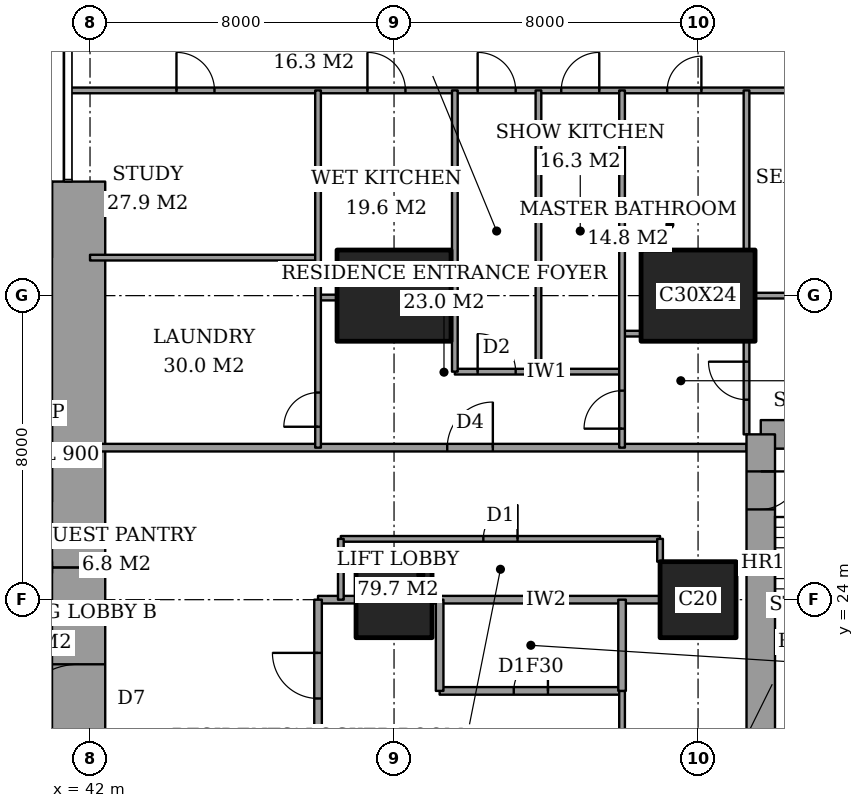
"""IFC4 building model, lengths in metres.
Left out: names, types, materials, properties, quantities, classifications, styles, units other than length and angle.
Written with IfcOpenShell. Run it as: python <this file> out.ifc"""

import sys

from ifc_helpers import new_model, si_unit, direction, frame, frame_2d, origin, origin_2d, place, context, subcontext, project, spatial, rectangle, extrude, element, fill, save


model = new_model("IFC4")
c1 = context("Model", 3, precision=1e-05, world=origin(), true_north=direction((0.0, 1.0)))
c2 = subcontext(c1, "Body", "Model", "MODEL_VIEW")
j1 = project(units=[si_unit("LENGTHUNIT", "METRE"), si_unit("PLANEANGLEUNIT", "RADIAN")], contexts=[c1])
p1 = place(None, origin())
s1 = spatial("IfcSite", under=j1, at=p1, CompositionType="ELEMENT")
p2 = place(p1, origin())
s2 = spatial("IfcBuilding", under=s1, at=p2, CompositionType="ELEMENT")
p3 = place(p2, frame((0.0, 0.0, 80.0)))
s3 = spatial("IfcBuildingStorey", under=s2, at=p3, CompositionType="ELEMENT", Elevation=80.0)
p4 = place(p3, frame((50.0, 24.0, 0.0), z_axis=(0.0, 0.0, 1.0), x_axis=(1.0, 0.0, 0.0)))
e1 = element("IfcColumn", 1, at=p4, inside=s3, PredefinedType="COLUMN", context=c2, shape_type="SweptSolid", body=[
    extrude(rectangle(XDim=2.0, YDim=2.0, at=origin_2d()), origin(), (0.0, 0.0, 1.0), 3.6),
])
p5 = place(p3, frame((50.0, 32.0, 0.0), z_axis=(0.0, 0.0, 1.0), x_axis=(1.0, 0.0, 0.0)))
e2 = element("IfcColumn", 2, at=p5, inside=s3, PredefinedType="COLUMN", context=c2, shape_type="SweptSolid", body=[
    extrude(rectangle(XDim=3.0, YDim=2.4, at=origin_2d()), origin(), (0.0, 0.0, 1.0), 3.6),
])
p6 = place(p3, frame((58.0, 24.0, 0.0), z_axis=(0.0, 0.0, 1.0), x_axis=(1.0, 0.0, 0.0)))
e3 = element("IfcColumn", 3, at=p6, inside=s3, PredefinedType="COLUMN", context=c2, shape_type="SweptSolid", body=[
    extrude(rectangle(XDim=2.0, YDim=2.0, at=origin_2d()), origin(), (0.0, 0.0, 1.0), 3.6),
])
p7 = place(p3, frame((58.0, 32.0, 0.0), z_axis=(0.0, 0.0, 1.0), x_axis=(1.0, 0.0, 0.0)))
e4 = element("IfcColumn", 4, at=p7, inside=s3, PredefinedType="COLUMN", context=c2, shape_type="SweptSolid", body=[
    extrude(rectangle(XDim=3.0, YDim=2.4, at=origin_2d()), origin(), (0.0, 0.0, 1.0), 3.6),
])
p8 = place(p3, frame((41.7, 13.0, 0.0), z_axis=(0.0, 0.0, 1.0), x_axis=(0.0, 1.0, 0.0)))
e5 = element("IfcWall", 5, at=p8, inside=s3, PredefinedType="SHEAR", context=c2, shape_type="SweptSolid", body=[
    extrude(rectangle(XDim=11.85, YDim=1.4, at=frame_2d((5.925, 0.0))), origin(), (0.0, 0.0, 1.0), 3.6),
])
p9 = place(p8, frame((7.5, 0.0, 0.0)))
e6 = element("IfcOpeningElement", 6, at=p9, cuts=e5, PredefinedType="OPENING", context=c2, shape_type="SweptSolid", body=[
    extrude(rectangle(XDim=1.8, YDim=2.4, at=frame_2d((0.9, 1.2))), frame((0.0, 0.71, 0.0), z_axis=(0.0, -1.0, 0.0), x_axis=(1.0, 0.0, 0.0)), (0.0, 0.0, 1.0), 1.42),
])
p10 = place(p3, frame((41.7, 24.85, 0.0), z_axis=(0.0, 0.0, 1.0), x_axis=(0.0, 1.0, 0.0)))
e7 = element("IfcWall", 7, at=p10, inside=s3, PredefinedType="SHEAR", context=c2, shape_type="SweptSolid", body=[
    extrude(rectangle(XDim=10.15, YDim=1.4, at=frame_2d((5.075, 0.0))), origin(), (0.0, 0.0, 1.0), 3.6),
])
p11 = place(p3, frame((64.1, 28.35, 0.0), z_axis=(0.0, 0.0, 1.0), x_axis=(-1.0, 0.0, 0.0)))
e8 = element("IfcWall", 8, at=p11, inside=s3, PredefinedType="SHEAR", context=c2, shape_type="SweptSolid", body=[
    extrude(rectangle(XDim=4.45, YDim=0.75, at=frame_2d((2.225, 0.0))), origin(), (0.0, 0.0, 1.0), 3.6),
])
p12 = place(p3, frame((59.65, 28.35, 0.0), z_axis=(0.0, 0.0, 1.0), x_axis=(0.0, -1.0, 0.0)))
e9 = element("IfcWall", 9, at=p12, inside=s3, PredefinedType="SHEAR", context=c2, shape_type="SweptSolid", body=[
    extrude(rectangle(XDim=8.7, YDim=0.75, at=frame_2d((4.35, 0.0))), origin(), (0.0, 0.0, 1.0), 3.6),
])
p13 = place(p12, frame((0.975, 0.0, 0.0)))
e10 = element("IfcOpeningElement", 10, at=p13, cuts=e9, PredefinedType="OPENING", context=c2, shape_type="SweptSolid", body=[
    extrude(rectangle(XDim=1.0, YDim=2.1, at=frame_2d((0.5, 1.05))), frame((0.0, 0.385, 0.0), z_axis=(0.0, -1.0, 0.0), x_axis=(1.0, 0.0, 0.0)), (0.0, 0.0, 1.0), 0.77),
])
p14 = place(p3, frame((51.2, 21.6, 0.0), z_axis=(0.0, 0.0, 1.0), x_axis=(1.0, 0.0, 0.0)))
e11 = element("IfcWall", 11, at=p14, inside=s3, PredefinedType="PARTITIONING", context=c2, shape_type="SweptSolid", body=[
    extrude(rectangle(XDim=4.8, YDim=0.2, at=frame_2d((2.4, 0.0))), origin(), (0.0, 0.0, 1.0), 3.35),
])
p15 = place(p14, frame((1.95, 0.0, 0.0)))
e12 = element("IfcOpeningElement", 12, at=p15, cuts=e11, PredefinedType="OPENING", context=c2, shape_type="SweptSolid", body=[
    extrude(rectangle(XDim=0.9, YDim=2.1, at=frame_2d((0.45, 1.05))), frame((0.0, 0.11, 0.0), z_axis=(0.0, -1.0, 0.0), x_axis=(1.0, 0.0, 0.0)), (0.0, 0.0, 1.0), 0.22),
])
p16 = place(p3, frame((48.0, 24.0, 0.0), z_axis=(0.0, 0.0, 1.0), x_axis=(1.0, 0.0, 0.0)))
e13 = element("IfcWall", 13, at=p16, inside=s3, PredefinedType="PARTITIONING", context=c2, shape_type="SweptSolid", body=[
    extrude(rectangle(XDim=1.0, YDim=0.2, at=frame_2d((0.5, 0.0))), origin(), (0.0, 0.0, 1.0), 3.35),
])
p17 = place(p3, frame((51.0, 24.0, 0.0), z_axis=(0.0, 0.0, 1.0), x_axis=(1.0, 0.0, 0.0)))
e14 = element("IfcWall", 14, at=p17, inside=s3, PredefinedType="PARTITIONING", context=c2, shape_type="SweptSolid", body=[
    extrude(rectangle(XDim=6.0, YDim=0.2, at=frame_2d((3.0, 0.0))), origin(), (0.0, 0.0, 1.0), 3.35),
])
p18 = place(p3, frame((48.6, 25.6, 0.0), z_axis=(0.0, 0.0, 1.0), x_axis=(1.0, 0.0, 0.0)))
e15 = element("IfcWall", 15, at=p18, inside=s3, PredefinedType="PARTITIONING", context=c2, shape_type="SweptSolid", body=[
    extrude(rectangle(XDim=8.4, YDim=0.15, at=frame_2d((4.2, 0.0))), origin(), (0.0, 0.0, 1.0), 3.35),
])
p19 = place(p18, frame((3.75, 0.0, 0.0)))
e16 = element("IfcOpeningElement", 16, at=p19, cuts=e15, PredefinedType="OPENING", context=c2, shape_type="SweptSolid", body=[
    extrude(rectangle(XDim=0.9, YDim=2.1, at=frame_2d((0.45, 1.05))), frame((0.0, 0.085, 0.0), z_axis=(0.0, -1.0, 0.0), x_axis=(1.0, 0.0, 0.0)), (0.0, 0.0, 1.0), 0.17),
])
p20 = place(p3, frame((42.0, 28.0, 0.0), z_axis=(0.0, 0.0, 1.0), x_axis=(1.0, 0.0, 0.0)))
e17 = element("IfcWall", 17, at=p20, inside=s3, PredefinedType="PARTITIONING", context=c2, shape_type="SweptSolid", body=[
    extrude(rectangle(XDim=17.275, YDim=0.2, at=frame_2d((8.637, 0.0))), origin(), (0.0, 0.0, 1.0), 3.35),
])
p21 = place(p20, frame((9.4, 0.0, 0.0)))
e18 = element("IfcOpeningElement", 18, at=p21, cuts=e17, PredefinedType="OPENING", context=c2, shape_type="SweptSolid", body=[
    extrude(rectangle(XDim=1.2, YDim=2.4, at=frame_2d((0.6, 1.2))), frame((0.0, 0.11, 0.0), z_axis=(0.0, -1.0, 0.0), x_axis=(1.0, 0.0, 0.0)), (0.0, 0.0, 1.0), 0.22),
])
p22 = place(p3, frame((51.6, 30.0, 0.0), z_axis=(0.0, 0.0, 1.0), x_axis=(1.0, 0.0, 0.0)))
e19 = element("IfcWall", 19, at=p22, inside=s3, PredefinedType="PARTITIONING", context=c2, shape_type="SweptSolid", body=[
    extrude(rectangle(XDim=4.4, YDim=0.15, at=frame_2d((2.2, 0.0))), origin(), (0.0, 0.0, 1.0), 3.35),
])
p23 = place(p22, frame((0.6, 0.0, 0.0)))
e20 = element("IfcOpeningElement", 20, at=p23, cuts=e19, PredefinedType="OPENING", context=c2, shape_type="SweptSolid", body=[
    extrude(rectangle(XDim=1.0, YDim=2.1, at=frame_2d((0.5, 1.05))), frame((0.0, 0.085, 0.0), z_axis=(0.0, -1.0, 0.0), x_axis=(1.0, 0.0, 0.0)), (0.0, 0.0, 1.0), 0.17),
])
p24 = place(p3, frame((56.0, 31.0, 0.0), z_axis=(0.0, 0.0, 1.0), x_axis=(1.0, 0.0, 0.0)))
e21 = element("IfcWall", 21, at=p24, inside=s3, PredefinedType="PARTITIONING", context=c2, shape_type="SweptSolid", body=[
    extrude(rectangle(XDim=0.5, YDim=0.15, at=frame_2d((0.25, 0.0))), origin(), (0.0, 0.0, 1.0), 3.35),
])
p25 = place(p3, frame((48.0, 31.95, 0.0), z_axis=(0.0, 0.0, 1.0), x_axis=(1.0, 0.0, 0.0)))
e22 = element("IfcWall", 22, at=p25, inside=s3, PredefinedType="PARTITIONING", context=c2, shape_type="SweptSolid", body=[
    extrude(rectangle(XDim=0.5, YDim=0.15, at=frame_2d((0.25, 0.0))), origin(), (0.0, 0.0, 1.0), 2.634),
])
p26 = place(p3, frame((59.5, 32.0, 0.0), z_axis=(0.0, 0.0, 1.0), x_axis=(1.0, 0.0, 0.0)))
e23 = element("IfcWall", 23, at=p26, inside=s3, PredefinedType="PARTITIONING", context=c2, shape_type="SweptSolid", body=[
    extrude(rectangle(XDim=5.15, YDim=0.15, at=frame_2d((2.575, 0.0))), origin(), (0.0, 0.0, 1.0), 2.634),
])
p27 = place(p3, frame((42.0, 33.0, 0.0), z_axis=(0.0, 0.0, 1.0), x_axis=(1.0, 0.0, 0.0)))
e24 = element("IfcWall", 24, at=p27, inside=s3, PredefinedType="PARTITIONING", context=c2, shape_type="SweptSolid", body=[
    extrude(rectangle(XDim=6.0, YDim=0.15, at=frame_2d((3.0, 0.0))), origin(), (0.0, 0.0, 1.0), 3.35),
])
p28 = place(p3, frame((41.439, 37.4, 0.0), z_axis=(0.0, 0.0, 1.0), x_axis=(1.0, 0.0, 0.0)))
e25 = element("IfcWall", 25, at=p28, inside=s3, PredefinedType="PARTITIONING", context=c2, shape_type="SweptSolid", body=[
    extrude(rectangle(XDim=25.011, YDim=0.15, at=frame_2d((12.505, 0.0))), origin(), (0.0, 0.0, 1.0), 3.35),
])
p29 = place(p28, frame((10.761, 0.0, 0.0)))
e26 = element("IfcOpeningElement", 26, at=p29, cuts=e25, PredefinedType="OPENING", context=c2, shape_type="SweptSolid", body=[
    extrude(rectangle(XDim=1.0, YDim=2.1, at=frame_2d((0.5, 1.05))), frame((0.0, 0.085, 0.0), z_axis=(0.0, -1.0, 0.0), x_axis=(1.0, 0.0, 0.0)), (0.0, 0.0, 1.0), 0.17),
])
p30 = place(p28, frame((20.924, 0.0, 0.0)))
e27 = element("IfcOpeningElement", 27, at=p30, cuts=e25, PredefinedType="OPENING", context=c2, shape_type="SweptSolid", body=[
    extrude(rectangle(XDim=1.0, YDim=2.1, at=frame_2d((0.5, 1.05))), frame((0.0, 0.085, 0.0), z_axis=(0.0, -1.0, 0.0), x_axis=(1.0, 0.0, 0.0)), (0.0, 0.0, 1.0), 0.17),
])
p31 = place(p28, frame((15.749, 0.0, 0.0)))
e28 = element("IfcOpeningElement", 28, at=p31, cuts=e25, PredefinedType="OPENING", context=c2, shape_type="SweptSolid", body=[
    extrude(rectangle(XDim=0.9, YDim=2.1, at=frame_2d((0.45, 1.05))), frame((0.0, 0.085, 0.0), z_axis=(0.0, -1.0, 0.0), x_axis=(1.0, 0.0, 0.0)), (0.0, 0.0, 1.0), 0.17),
])
p32 = place(p28, frame((12.961, 0.0, 0.0)))
e29 = element("IfcOpeningElement", 29, at=p32, cuts=e25, PredefinedType="OPENING", context=c2, shape_type="SweptSolid", body=[
    extrude(rectangle(XDim=1.0, YDim=2.1, at=frame_2d((0.5, 1.05))), frame((0.0, 0.085, 0.0), z_axis=(0.0, -1.0, 0.0), x_axis=(1.0, 0.0, 0.0)), (0.0, 0.0, 1.0), 0.17),
])
p33 = place(p28, frame((7.861, 0.0, 0.0)))
e30 = element("IfcOpeningElement", 30, at=p33, cuts=e25, PredefinedType="OPENING", context=c2, shape_type="SweptSolid", body=[
    extrude(rectangle(XDim=1.0, YDim=2.1, at=frame_2d((0.5, 1.05))), frame((0.0, 0.085, 0.0), z_axis=(0.0, -1.0, 0.0), x_axis=(1.0, 0.0, 0.0)), (0.0, 0.0, 1.0), 0.17),
])
p34 = place(p28, frame((2.836, 0.0, 0.0)))
e31 = element("IfcOpeningElement", 31, at=p34, cuts=e25, PredefinedType="OPENING", context=c2, shape_type="SweptSolid", body=[
    extrude(rectangle(XDim=1.0, YDim=2.1, at=frame_2d((0.5, 1.05))), frame((0.0, 0.085, 0.0), z_axis=(0.0, -1.0, 0.0), x_axis=(1.0, 0.0, 0.0)), (0.0, 0.0, 1.0), 0.17),
])
p35 = place(p3, frame((48.0, 17.0, 0.0), z_axis=(0.0, 0.0, 1.0), x_axis=(0.0, 1.0, 0.0)))
e32 = element("IfcWall", 32, at=p35, inside=s3, PredefinedType="PARTITIONING", context=c2, shape_type="SweptSolid", body=[
    extrude(rectangle(XDim=7.0, YDim=0.2, at=frame_2d((3.5, 0.0))), origin(), (0.0, 0.0, 1.0), 3.35),
])
p36 = place(p35, frame((4.4, 0.0, 0.0)))
e33 = element("IfcOpeningElement", 33, at=p36, cuts=e32, PredefinedType="OPENING", context=c2, shape_type="SweptSolid", body=[
    extrude(rectangle(XDim=1.2, YDim=2.4, at=frame_2d((0.6, 1.2))), frame((0.0, 0.11, 0.0), z_axis=(0.0, -1.0, 0.0), x_axis=(1.0, 0.0, 0.0)), (0.0, 0.0, 1.0), 0.22),
])
p37 = place(p35, frame((1.05, 0.0, 0.0)))
e34 = element("IfcOpeningElement", 34, at=p37, cuts=e32, PredefinedType="OPENING", context=c2, shape_type="SweptSolid", body=[
    extrude(rectangle(XDim=0.9, YDim=2.1, at=frame_2d((0.45, 1.05))), frame((0.0, 0.11, 0.0), z_axis=(0.0, -1.0, 0.0), x_axis=(1.0, 0.0, 0.0)), (0.0, 0.0, 1.0), 0.22),
])
p38 = place(p3, frame((48.0, 28.0, 0.0), z_axis=(0.0, 0.0, 1.0), x_axis=(0.0, 1.0, 0.0)))
e35 = element("IfcWall", 35, at=p38, inside=s3, PredefinedType="PARTITIONING", context=c2, shape_type="SweptSolid", body=[
    extrude(rectangle(XDim=9.4, YDim=0.15, at=frame_2d((4.7, 0.0))), origin(), (0.0, 0.0, 1.0), 3.35),
])
p39 = place(p38, frame((0.55, 0.0, 0.0)))
e36 = element("IfcOpeningElement", 36, at=p39, cuts=e35, PredefinedType="OPENING", context=c2, shape_type="SweptSolid", body=[
    extrude(rectangle(XDim=0.9, YDim=2.1, at=frame_2d((0.45, 1.05))), frame((0.0, 0.085, 0.0), z_axis=(0.0, -1.0, 0.0), x_axis=(1.0, 0.0, 0.0)), (0.0, 0.0, 1.0), 0.17),
])
p40 = place(p3, frame((48.6, 24.0, 0.0), z_axis=(0.0, 0.0, 1.0), x_axis=(0.0, 1.0, 0.0)))
e37 = element("IfcWall", 37, at=p40, inside=s3, PredefinedType="PARTITIONING", context=c2, shape_type="SweptSolid", body=[
    extrude(rectangle(XDim=1.6, YDim=0.15, at=frame_2d((0.8, 0.0))), origin(), (0.0, 0.0, 1.0), 3.35),
])
p41 = place(p3, frame((51.2, 21.6, 0.0), z_axis=(0.0, 0.0, 1.0), x_axis=(0.0, 1.0, 0.0)))
e38 = element("IfcWall", 38, at=p41, inside=s3, PredefinedType="PARTITIONING", context=c2, shape_type="SweptSolid", body=[
    extrude(rectangle(XDim=2.4, YDim=0.2, at=frame_2d((1.2, 0.0))), origin(), (0.0, 0.0, 1.0), 3.35),
])
for number, where, z_axis, x_axis in (
    (39, (51.6, 30.0, 0.0), (0.0, 0.0, 1.0), (0.0, 1.0, 0.0)),
    (40, (53.8, 30.0, 0.0), (0.0, 0.0, 1.0), (0.0, 1.0, 0.0)),
):
    element("IfcWall", number, at=place(p3, frame(where, z_axis=z_axis, x_axis=x_axis)), inside=s3, PredefinedType="PARTITIONING", context=c2, shape_type="SweptSolid", body=[
        extrude(rectangle(XDim=7.4, YDim=0.15, at=frame_2d((3.7, 0.0))), origin(), (0.0, 0.0, 1.0), 3.35),
    ])
p42 = place(p3, frame((56.0, 21.6, 0.0), z_axis=(0.0, 0.0, 1.0), x_axis=(0.0, 1.0, 0.0)))
e41 = element("IfcWall", 41, at=p42, inside=s3, PredefinedType="PARTITIONING", context=c2, shape_type="SweptSolid", body=[
    extrude(rectangle(XDim=2.4, YDim=0.2, at=frame_2d((1.2, 0.0))), origin(), (0.0, 0.0, 1.0), 3.35),
])
p43 = place(p3, frame((56.0, 10.6, 0.0), z_axis=(0.0, 0.0, 1.0), x_axis=(0.0, 1.0, 0.0)))
e42 = element("IfcWall", 42, at=p43, inside=s3, PredefinedType="PARTITIONING", context=c2, shape_type="SweptSolid", body=[
    extrude(rectangle(XDim=11.0, YDim=0.15, at=frame_2d((5.5, 0.0))), origin(), (0.0, 0.0, 1.0), 3.35),
])
p44 = place(p43, frame((8.2, 0.0, 0.0)))
e43 = element("IfcOpeningElement", 43, at=p44, cuts=e42, PredefinedType="OPENING", context=c2, shape_type="SweptSolid", body=[
    extrude(rectangle(XDim=1.0, YDim=2.1, at=frame_2d((0.5, 1.05))), frame((0.0, 0.085, 0.0), z_axis=(0.0, -1.0, 0.0), x_axis=(1.0, 0.0, 0.0)), (0.0, 0.0, 1.0), 0.17),
])
p45 = place(p3, frame((56.0, 28.0, 0.0), z_axis=(0.0, 0.0, 1.0), x_axis=(0.0, 1.0, 0.0)))
e44 = element("IfcWall", 44, at=p45, inside=s3, PredefinedType="PARTITIONING", context=c2, shape_type="SweptSolid", body=[
    extrude(rectangle(XDim=9.4, YDim=0.15, at=frame_2d((4.7, 0.0))), origin(), (0.0, 0.0, 1.0), 3.35),
])
p46 = place(p45, frame((0.5, 0.0, 0.0)))
e45 = element("IfcOpeningElement", 45, at=p46, cuts=e44, PredefinedType="OPENING", context=c2, shape_type="SweptSolid", body=[
    extrude(rectangle(XDim=1.0, YDim=2.1, at=frame_2d((0.5, 1.05))), frame((0.0, 0.085, 0.0), z_axis=(0.0, -1.0, 0.0), x_axis=(1.0, 0.0, 0.0)), (0.0, 0.0, 1.0), 0.17),
])
p47 = place(p3, frame((57.0, 25.0, 0.0), z_axis=(0.0, 0.0, 1.0), x_axis=(0.0, 1.0, 0.0)))
e46 = element("IfcWall", 46, at=p47, inside=s3, PredefinedType="PARTITIONING", context=c2, shape_type="SweptSolid", body=[
    extrude(rectangle(XDim=0.6, YDim=0.15, at=frame_2d((0.3, 0.0))), origin(), (0.0, 0.0, 1.0), 3.35),
])
p48 = place(p3, frame((59.275, 28.35, 0.0), z_axis=(0.0, 0.0, 1.0), x_axis=(0.0, 1.0, 0.0)))
e47 = element("IfcWall", 47, at=p48, inside=s3, PredefinedType="PARTITIONING", context=c2, shape_type="SweptSolid", body=[
    extrude(rectangle(XDim=2.45, YDim=0.15, at=frame_2d((1.225, 0.0))), origin(), (0.0, 0.0, 1.0), 3.35),
])
p49 = place(p48, frame((0.913, 0.0, 0.0)))
e48 = element("IfcOpeningElement", 48, at=p49, cuts=e47, PredefinedType="OPENING", context=c2, shape_type="SweptSolid", body=[
    extrude(rectangle(XDim=1.0, YDim=2.1, at=frame_2d((0.5, 1.05))), frame((0.0, 0.085, 0.0), z_axis=(0.0, -1.0, 0.0), x_axis=(1.0, 0.0, 0.0)), (0.0, 0.0, 1.0), 0.17),
])
p50 = place(p3, frame((59.275, 33.2, 0.0), z_axis=(0.0, 0.0, 1.0), x_axis=(0.0, 1.0, 0.0)))
e49 = element("IfcWall", 49, at=p50, inside=s3, PredefinedType="PARTITIONING", context=c2, shape_type="SweptSolid", body=[
    extrude(rectangle(XDim=4.2, YDim=0.15, at=frame_2d((2.1, 0.0))), origin(), (0.0, 0.0, 1.0), 3.35),
])
p51 = place(p15, origin())
e50 = element("IfcDoor", 50, at=p51, inside=s3, OperationType="SINGLE_SWING_LEFT", PredefinedType="DOOR", context=c2, shape_type="SweptSolid", body=[
    extrude(rectangle(XDim=0.9, YDim=2.1, at=frame_2d((0.45, 1.05))), frame((0.0, 0.025, 0.0), z_axis=(0.0, -1.0, 0.0), x_axis=(1.0, 0.0, 0.0)), (0.0, 0.0, 1.0), 0.05),
])
fill(e12, e50)
p52 = place(p36, origin())
e51 = element("IfcDoor", 51, at=p52, inside=s3, OperationType="SINGLE_SWING_LEFT", PredefinedType="DOOR", context=c2, shape_type="SweptSolid", body=[
    extrude(rectangle(XDim=1.2, YDim=2.4, at=frame_2d((0.6, 1.2))), frame((0.0, 0.025, 0.0), z_axis=(0.0, -1.0, 0.0), x_axis=(1.0, 0.0, 0.0)), (0.0, 0.0, 1.0), 0.05),
])
fill(e33, e51)
p53 = place(p29, origin())
e52 = element("IfcDoor", 52, at=p53, inside=s3, OperationType="SINGLE_SWING_RIGHT", PredefinedType="DOOR", context=c2, shape_type="SweptSolid", body=[
    extrude(rectangle(XDim=1.0, YDim=2.1, at=frame_2d((0.5, 1.05))), frame((0.0, 0.025, 0.0), z_axis=(0.0, -1.0, 0.0), x_axis=(1.0, 0.0, 0.0)), (0.0, 0.0, 1.0), 0.05),
])
fill(e26, e52)
p54 = place(p49, origin())
e53 = element("IfcDoor", 53, at=p54, inside=s3, OperationType="SINGLE_SWING_LEFT", PredefinedType="DOOR", context=c2, shape_type="SweptSolid", body=[
    extrude(rectangle(XDim=1.0, YDim=2.1, at=frame_2d((0.5, 1.05))), frame((0.0, 0.025, 0.0), z_axis=(0.0, -1.0, 0.0), x_axis=(1.0, 0.0, 0.0)), (0.0, 0.0, 1.0), 0.05),
])
fill(e48, e53)
p55 = place(p31, origin())
e54 = element("IfcDoor", 54, at=p55, inside=s3, OperationType="SINGLE_SWING_LEFT", PredefinedType="DOOR", context=c2, shape_type="SweptSolid", body=[
    extrude(rectangle(XDim=0.9, YDim=2.1, at=frame_2d((0.45, 1.05))), frame((0.0, 0.025, 0.0), z_axis=(0.0, -1.0, 0.0), x_axis=(1.0, 0.0, 0.0)), (0.0, 0.0, 1.0), 0.05),
])
fill(e28, e54)
p56 = place(p46, origin())
e55 = element("IfcDoor", 55, at=p56, inside=s3, OperationType="SINGLE_SWING_RIGHT", PredefinedType="DOOR", context=c2, shape_type="SweptSolid", body=[
    extrude(rectangle(XDim=1.0, YDim=2.1, at=frame_2d((0.5, 1.05))), frame((0.0, 0.025, 0.0), z_axis=(0.0, -1.0, 0.0), x_axis=(1.0, 0.0, 0.0)), (0.0, 0.0, 1.0), 0.05),
])
fill(e45, e55)
p57 = place(p21, origin())
e56 = element("IfcDoor", 56, at=p57, inside=s3, OperationType="SINGLE_SWING_LEFT", PredefinedType="DOOR", context=c2, shape_type="SweptSolid", body=[
    extrude(rectangle(XDim=1.2, YDim=2.4, at=frame_2d((0.6, 1.2))), frame((0.0, 0.025, 0.0), z_axis=(0.0, -1.0, 0.0), x_axis=(1.0, 0.0, 0.0)), (0.0, 0.0, 1.0), 0.05),
])
fill(e18, e56)
p58 = place(p32, origin())
e57 = element("IfcDoor", 57, at=p58, inside=s3, OperationType="SINGLE_SWING_LEFT", PredefinedType="DOOR", context=c2, shape_type="SweptSolid", body=[
    extrude(rectangle(XDim=1.0, YDim=2.1, at=frame_2d((0.5, 1.05))), frame((0.0, 0.025, 0.0), z_axis=(0.0, -1.0, 0.0), x_axis=(1.0, 0.0, 0.0)), (0.0, 0.0, 1.0), 0.05),
])
fill(e29, e57)
p59 = place(p23, origin())
e58 = element("IfcDoor", 58, at=p59, inside=s3, OperationType="SINGLE_SWING_RIGHT", PredefinedType="DOOR", context=c2, shape_type="SweptSolid", body=[
    extrude(rectangle(XDim=1.0, YDim=2.1, at=frame_2d((0.5, 1.05))), frame((0.0, 0.025, 0.0), z_axis=(0.0, -1.0, 0.0), x_axis=(1.0, 0.0, 0.0)), (0.0, 0.0, 1.0), 0.05),
])
fill(e20, e58)
p60 = place(p33, origin())
e59 = element("IfcDoor", 59, at=p60, inside=s3, OperationType="SINGLE_SWING_RIGHT", PredefinedType="DOOR", context=c2, shape_type="SweptSolid", body=[
    extrude(rectangle(XDim=1.0, YDim=2.1, at=frame_2d((0.5, 1.05))), frame((0.0, 0.025, 0.0), z_axis=(0.0, -1.0, 0.0), x_axis=(1.0, 0.0, 0.0)), (0.0, 0.0, 1.0), 0.05),
])
fill(e30, e59)
p61 = place(p34, origin())
e60 = element("IfcDoor", 60, at=p61, inside=s3, OperationType="SINGLE_SWING_RIGHT", PredefinedType="DOOR", context=c2, shape_type="SweptSolid", body=[
    extrude(rectangle(XDim=1.0, YDim=2.1, at=frame_2d((0.5, 1.05))), frame((0.0, 0.025, 0.0), z_axis=(0.0, -1.0, 0.0), x_axis=(1.0, 0.0, 0.0)), (0.0, 0.0, 1.0), 0.05),
])
fill(e31, e60)
p62 = place(p39, origin())
e61 = element("IfcDoor", 61, at=p62, inside=s3, OperationType="SINGLE_SWING_RIGHT", PredefinedType="DOOR", context=c2, shape_type="SweptSolid", body=[
    extrude(rectangle(XDim=0.9, YDim=2.1, at=frame_2d((0.45, 1.05))), frame((0.0, 0.025, 0.0), z_axis=(0.0, -1.0, 0.0), x_axis=(1.0, 0.0, 0.0)), (0.0, 0.0, 1.0), 0.05),
])
fill(e36, e61)
p63 = place(p19, origin())
e62 = element("IfcDoor", 62, at=p63, inside=s3, OperationType="SINGLE_SWING_LEFT", PredefinedType="DOOR", context=c2, shape_type="SweptSolid", body=[
    extrude(rectangle(XDim=0.9, YDim=2.1, at=frame_2d((0.45, 1.05))), frame((0.0, 0.025, 0.0), z_axis=(0.0, -1.0, 0.0), x_axis=(1.0, 0.0, 0.0)), (0.0, 0.0, 1.0), 0.05),
])
fill(e16, e62)
p64 = place(p9, origin())
e63 = element("IfcDoor", 63, at=p64, inside=s3, OperationType="DOUBLE_DOOR_DOUBLE_SWING", PredefinedType="DOOR", context=c2, shape_type="SweptSolid", body=[
    extrude(rectangle(XDim=1.8, YDim=2.4, at=frame_2d((0.9, 1.2))), frame((0.0, 0.025, 0.0), z_axis=(0.0, -1.0, 0.0), x_axis=(1.0, 0.0, 0.0)), (0.0, 0.0, 1.0), 0.05),
])
fill(e6, e63)
p65 = place(p13, origin())
e64 = element("IfcDoor", 64, at=p65, inside=s3, OperationType="SINGLE_SWING_RIGHT", PredefinedType="DOOR", context=c2, shape_type="SweptSolid", body=[
    extrude(rectangle(XDim=1.0, YDim=2.1, at=frame_2d((0.5, 1.05))), frame((0.0, 0.025, 0.0), z_axis=(0.0, -1.0, 0.0), x_axis=(1.0, 0.0, 0.0)), (0.0, 0.0, 1.0), 0.05),
])
fill(e10, e64)
save(model, sys.argv[1])
